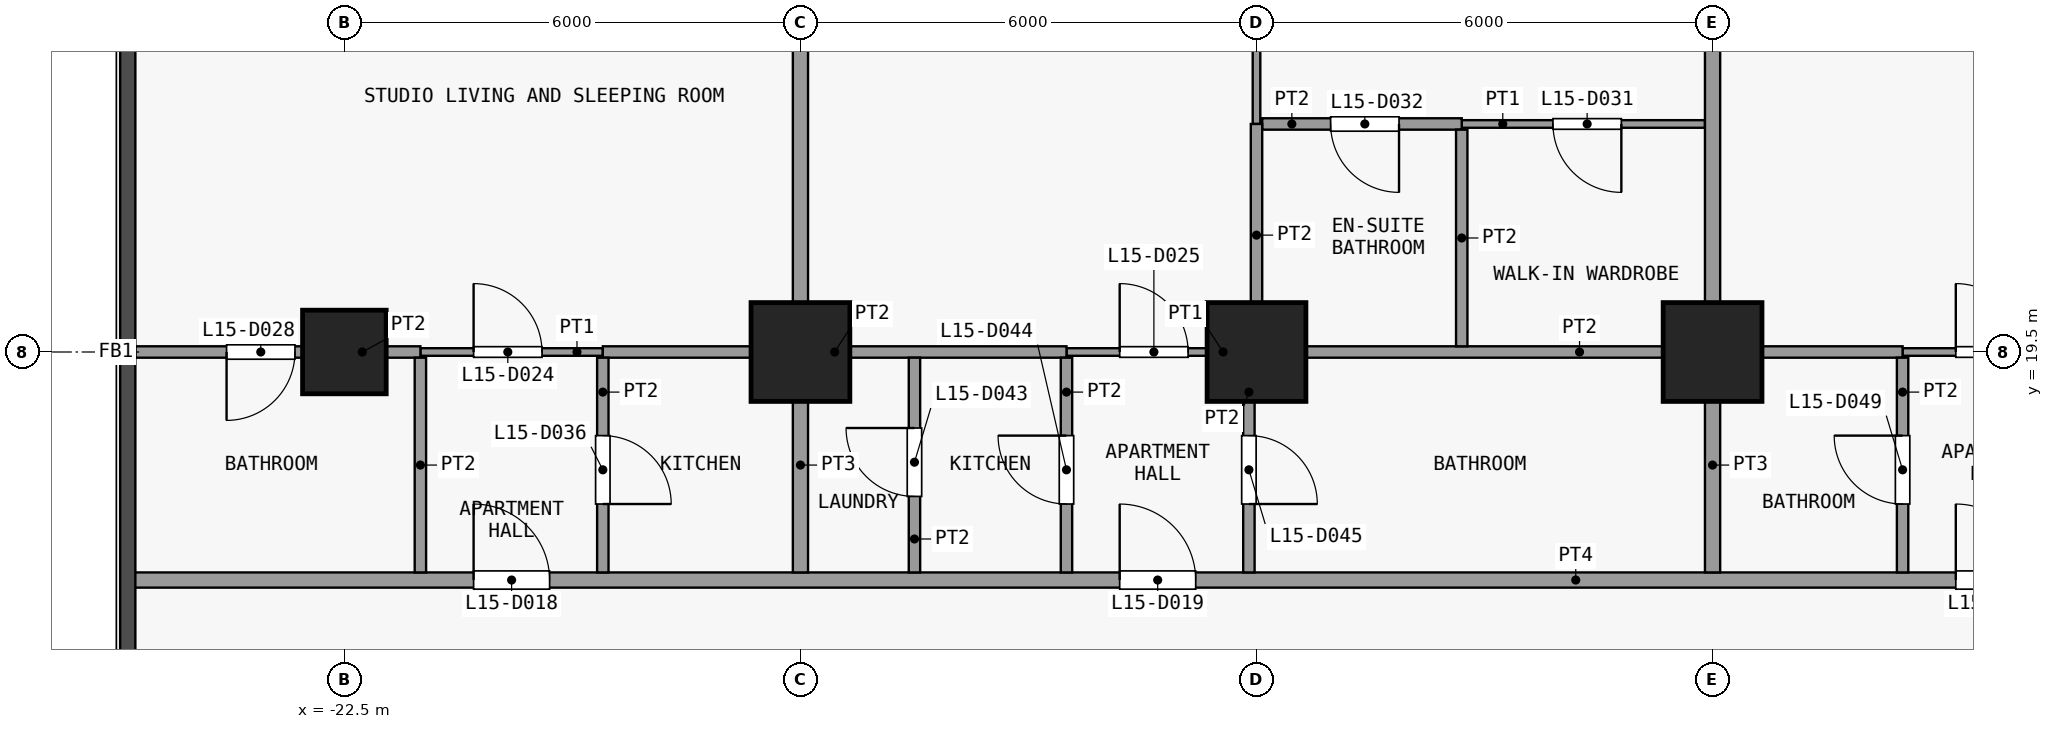
"""IFC4 building model, lengths in metres.
Left out: names, types, materials, properties, quantities, classifications, styles, units other than length and angle.
Written with IfcOpenShell. Run it as: python <this file> out.ifc"""

import sys

from ifc_helpers import new_model, si_unit, direction, frame, frame_2d, origin, origin_2d, place, context, subcontext, project, spatial, rectangle, extrude, element, fill, save


model = new_model("IFC4")
c1 = context("Model", 3, precision=1e-05, world=origin(), true_north=direction((0.0, 1.0)))
c2 = subcontext(c1, "Body", "Model", "MODEL_VIEW")
j1 = project(units=[si_unit("LENGTHUNIT", "METRE"), si_unit("PLANEANGLEUNIT", "RADIAN")], contexts=[c1])
p1 = place(None, origin())
s1 = spatial("IfcSite", under=j1, at=p1, CompositionType="ELEMENT")
p2 = place(p1, origin())
s2 = spatial("IfcBuilding", under=s1, at=p2, CompositionType="ELEMENT")
p3 = place(p2, frame((0.0, 0.0, 64.9)))
s3 = spatial("IfcBuildingStorey", under=s2, at=p3, CompositionType="ELEMENT", Elevation=64.9)
p4 = place(p3, frame((-22.5, 19.5, 0.0), z_axis=(0.0, 0.0, 1.0), x_axis=(1.0, 0.0, 0.0)))
e1 = element("IfcColumn", 1, at=p4, inside=s3, PredefinedType="COLUMN", context=c2, shape_type="SweptSolid", body=[
    extrude(rectangle(XDim=1.1, YDim=1.1, at=origin_2d()), origin(), (0.0, 0.0, 1.0), 3.6),
])
for number, where, z_axis, x_axis in (
    (2, (-16.5, 19.5, 0.0), (0.0, 0.0, 1.0), (1.0, 0.0, 0.0)),
    (3, (-10.5, 19.5, 0.0), (0.0, 0.0, 1.0), (1.0, 0.0, 0.0)),
    (4, (-4.5, 19.5, 0.0), (0.0, 0.0, 1.0), (1.0, 0.0, 0.0)),
):
    element("IfcColumn", number, at=place(p3, frame(where, z_axis=z_axis, x_axis=x_axis)), inside=s3, PredefinedType="COLUMN", context=c2, shape_type="SweptSolid", body=[
        extrude(rectangle(XDim=1.3, YDim=1.3, at=origin_2d()), origin(), (0.0, 0.0, 1.0), 3.6),
    ])
p5 = place(p3, frame((-25.35, 16.5, 0.0), z_axis=(0.0, 0.0, 1.0), x_axis=(1.0, 0.0, 0.0)))
e5 = element("IfcWall", 5, at=p5, inside=s3, PredefinedType="PARTITIONING", context=c2, shape_type="SweptSolid", body=[
    extrude(rectangle(XDim=51.6, YDim=0.2, at=frame_2d((25.8, 0.0))), origin(), (0.0, 0.0, 1.0), 3.3),
])
p6 = place(p5, frame((4.55, 0.0, 0.0)))
e6 = element("IfcOpeningElement", 6, at=p6, cuts=e5, PredefinedType="OPENING", context=c2, shape_type="SweptSolid", body=[
    extrude(rectangle(XDim=1.0, YDim=2.1, at=frame_2d((0.5, 1.05))), frame((0.0, 0.11, 0.0), z_axis=(0.0, -1.0, 0.0), x_axis=(1.0, 0.0, 0.0)), (0.0, 0.0, 1.0), 0.22),
])
p7 = place(p5, frame((13.05, 0.0, 0.0)))
e7 = element("IfcOpeningElement", 7, at=p7, cuts=e5, PredefinedType="OPENING", context=c2, shape_type="SweptSolid", body=[
    extrude(rectangle(XDim=1.0, YDim=2.1, at=frame_2d((0.5, 1.05))), frame((0.0, 0.11, 0.0), z_axis=(0.0, -1.0, 0.0), x_axis=(1.0, 0.0, 0.0)), (0.0, 0.0, 1.0), 0.22),
])
p8 = place(p5, frame((24.05, 0.0, 0.0)))
e8 = element("IfcOpeningElement", 8, at=p8, cuts=e5, PredefinedType="OPENING", context=c2, shape_type="SweptSolid", body=[
    extrude(rectangle(XDim=1.0, YDim=2.1, at=frame_2d((0.5, 1.05))), frame((0.0, 0.11, 0.0), z_axis=(0.0, -1.0, 0.0), x_axis=(1.0, 0.0, 0.0)), (0.0, 0.0, 1.0), 0.22),
])
p9 = place(p5, frame((32.35, 0.0, 0.0)))
e9 = element("IfcOpeningElement", 9, at=p9, cuts=e5, PredefinedType="OPENING", context=c2, shape_type="SweptSolid", body=[
    extrude(rectangle(XDim=0.9, YDim=2.1, at=frame_2d((0.45, 1.05))), frame((0.0, 0.11, 0.0), z_axis=(0.0, -1.0, 0.0), x_axis=(1.0, 0.0, 0.0)), (0.0, 0.0, 1.0), 0.22),
])
p10 = place(p5, frame((38.35, 0.0, 0.0)))
e10 = element("IfcOpeningElement", 10, at=p10, cuts=e5, PredefinedType="OPENING", context=c2, shape_type="SweptSolid", body=[
    extrude(rectangle(XDim=0.9, YDim=2.1, at=frame_2d((0.45, 1.05))), frame((0.0, 0.11, 0.0), z_axis=(0.0, -1.0, 0.0), x_axis=(1.0, 0.0, 0.0)), (0.0, 0.0, 1.0), 0.22),
])
p11 = place(p5, frame((45.05, 0.0, 0.0)))
e11 = element("IfcOpeningElement", 11, at=p11, cuts=e5, PredefinedType="OPENING", context=c2, shape_type="SweptSolid", body=[
    extrude(rectangle(XDim=1.0, YDim=2.1, at=frame_2d((0.5, 1.05))), frame((0.0, 0.11, 0.0), z_axis=(0.0, -1.0, 0.0), x_axis=(1.0, 0.0, 0.0)), (0.0, 0.0, 1.0), 0.22),
])
p12 = place(p3, frame((-21.5, 19.5, 0.0), z_axis=(0.0, 0.0, 1.0), x_axis=(1.0, 0.0, 0.0)))
e12 = element("IfcWall", 12, at=p12, inside=s3, PredefinedType="PARTITIONING", context=c2, shape_type="SweptSolid", body=[
    extrude(rectangle(XDim=2.4, YDim=0.1, at=frame_2d((1.2, 0.0))), origin(), (0.0, 0.0, 1.0), 3.3),
])
p13 = place(p12, frame((0.7, 0.0, 0.0)))
e13 = element("IfcOpeningElement", 13, at=p13, cuts=e12, PredefinedType="OPENING", context=c2, shape_type="SweptSolid", body=[
    extrude(rectangle(XDim=0.9, YDim=2.1, at=frame_2d((0.45, 1.05))), frame((0.0, 0.06, 0.0), z_axis=(0.0, -1.0, 0.0), x_axis=(1.0, 0.0, 0.0)), (0.0, 0.0, 1.0), 0.12),
])
p14 = place(p3, frame((-13.0, 19.5, 0.0), z_axis=(0.0, 0.0, 1.0), x_axis=(1.0, 0.0, 0.0)))
e14 = element("IfcWall", 14, at=p14, inside=s3, PredefinedType="PARTITIONING", context=c2, shape_type="SweptSolid", body=[
    extrude(rectangle(XDim=2.4, YDim=0.1, at=frame_2d((1.2, 0.0))), origin(), (0.0, 0.0, 1.0), 3.3),
])
p15 = place(p14, frame((0.7, 0.0, 0.0)))
e15 = element("IfcOpeningElement", 15, at=p15, cuts=e14, PredefinedType="OPENING", context=c2, shape_type="SweptSolid", body=[
    extrude(rectangle(XDim=0.9, YDim=2.1, at=frame_2d((0.45, 1.05))), frame((0.0, 0.06, 0.0), z_axis=(0.0, -1.0, 0.0), x_axis=(1.0, 0.0, 0.0)), (0.0, 0.0, 1.0), 0.12),
])
p16 = place(p3, frame((-2.0, 19.5, 0.0), z_axis=(0.0, 0.0, 1.0), x_axis=(1.0, 0.0, 0.0)))
e16 = element("IfcWall", 16, at=p16, inside=s3, PredefinedType="PARTITIONING", context=c2, shape_type="SweptSolid", body=[
    extrude(rectangle(XDim=2.4, YDim=0.1, at=frame_2d((1.2, 0.0))), origin(), (0.0, 0.0, 1.0), 3.3),
])
p17 = place(p16, frame((0.7, 0.0, 0.0)))
e17 = element("IfcOpeningElement", 17, at=p17, cuts=e16, PredefinedType="OPENING", context=c2, shape_type="SweptSolid", body=[
    extrude(rectangle(XDim=0.9, YDim=2.1, at=frame_2d((0.45, 1.05))), frame((0.0, 0.06, 0.0), z_axis=(0.0, -1.0, 0.0), x_axis=(1.0, 0.0, 0.0)), (0.0, 0.0, 1.0), 0.12),
])
p18 = place(p3, frame((-25.25, 19.5, 0.0), z_axis=(0.0, 0.0, 1.0), x_axis=(1.0, 0.0, 0.0)))
e18 = element("IfcWall", 18, at=p18, inside=s3, PredefinedType="PARTITIONING", context=c2, shape_type="SweptSolid", body=[
    extrude(rectangle(XDim=3.75, YDim=0.15, at=frame_2d((1.875, 0.0))), origin(), (0.0, 0.0, 1.0), 3.3),
])
p19 = place(p18, frame((1.2, 0.0, 0.0)))
e19 = element("IfcOpeningElement", 19, at=p19, cuts=e18, PredefinedType="OPENING", context=c2, shape_type="SweptSolid", body=[
    extrude(rectangle(XDim=0.9, YDim=2.1, at=frame_2d((0.45, 1.05))), frame((0.0, 0.085, 0.0), z_axis=(0.0, -1.0, 0.0), x_axis=(1.0, 0.0, 0.0)), (0.0, 0.0, 1.0), 0.17),
])
p20 = place(p3, frame((-19.1, 19.5, 0.0), z_axis=(0.0, 0.0, 1.0), x_axis=(1.0, 0.0, 0.0)))
e20 = element("IfcWall", 20, at=p20, inside=s3, PredefinedType="PARTITIONING", context=c2, shape_type="SweptSolid", body=[
    extrude(rectangle(XDim=6.1, YDim=0.15, at=frame_2d((3.05, 0.0))), origin(), (0.0, 0.0, 1.0), 3.3),
])
p21 = place(p3, frame((-10.5, 19.5, 0.0), z_axis=(0.0, 0.0, 1.0), x_axis=(1.0, 0.0, 0.0)))
e21 = element("IfcWall", 21, at=p21, inside=s3, PredefinedType="PARTITIONING", context=c2, shape_type="SweptSolid", body=[
    extrude(rectangle(XDim=8.5, YDim=0.15, at=frame_2d((4.25, 0.0))), origin(), (0.0, 0.0, 1.0), 3.3),
])
p22 = place(p3, frame((-7.8, 22.5, 0.0), z_axis=(0.0, 0.0, 1.0), x_axis=(1.0, 0.0, 0.0)))
e22 = element("IfcWall", 22, at=p22, inside=s3, PredefinedType="PARTITIONING", context=c2, shape_type="SweptSolid", body=[
    extrude(rectangle(XDim=3.2, YDim=0.1, at=frame_2d((1.6, 0.0))), origin(), (0.0, 0.0, 1.0), 3.3),
])
p23 = place(p22, frame((1.2, 0.0, 0.0)))
e23 = element("IfcOpeningElement", 23, at=p23, cuts=e22, PredefinedType="OPENING", context=c2, shape_type="SweptSolid", body=[
    extrude(rectangle(XDim=0.9, YDim=2.1, at=frame_2d((0.45, 1.05))), frame((0.0, 0.06, 0.0), z_axis=(0.0, -1.0, 0.0), x_axis=(1.0, 0.0, 0.0)), (0.0, 0.0, 1.0), 0.12),
])
p24 = place(p3, frame((-10.425, 22.5, 0.0), z_axis=(0.0, 0.0, 1.0), x_axis=(1.0, 0.0, 0.0)))
e24 = element("IfcWall", 24, at=p24, inside=s3, PredefinedType="PARTITIONING", context=c2, shape_type="SweptSolid", body=[
    extrude(rectangle(XDim=2.625, YDim=0.15, at=frame_2d((1.312, 0.0))), origin(), (0.0, 0.0, 1.0), 3.3),
])
p25 = place(p24, frame((0.9, 0.0, 0.0)))
e25 = element("IfcOpeningElement", 25, at=p25, cuts=e24, PredefinedType="OPENING", context=c2, shape_type="SweptSolid", body=[
    extrude(rectangle(XDim=0.9, YDim=2.1, at=frame_2d((0.45, 1.05))), frame((0.0, 0.085, 0.0), z_axis=(0.0, -1.0, 0.0), x_axis=(1.0, 0.0, 0.0)), (0.0, 0.0, 1.0), 0.17),
])
p26 = place(p3, frame((-21.5, 16.6, 0.0), z_axis=(0.0, 0.0, 1.0), x_axis=(0.0, 1.0, 0.0)))
e26 = element("IfcWall", 26, at=p26, inside=s3, PredefinedType="PARTITIONING", context=c2, shape_type="SweptSolid", body=[
    extrude(rectangle(XDim=2.825, YDim=0.15, at=frame_2d((1.413, 0.0))), origin(), (0.0, 0.0, 1.0), 3.3),
])
p27 = place(p3, frame((-19.1, 16.6, 0.0), z_axis=(0.0, 0.0, 1.0), x_axis=(0.0, 1.0, 0.0)))
e27 = element("IfcWall", 27, at=p27, inside=s3, PredefinedType="PARTITIONING", context=c2, shape_type="SweptSolid", body=[
    extrude(rectangle(XDim=2.825, YDim=0.15, at=frame_2d((1.413, 0.0))), origin(), (0.0, 0.0, 1.0), 3.3),
])
p28 = place(p27, frame((0.9, 0.0, 0.0)))
e28 = element("IfcOpeningElement", 28, at=p28, cuts=e27, PredefinedType="OPENING", context=c2, shape_type="SweptSolid", body=[
    extrude(rectangle(XDim=0.9, YDim=2.1, at=frame_2d((0.45, 1.05))), frame((0.0, 0.085, 0.0), z_axis=(0.0, -1.0, 0.0), x_axis=(1.0, 0.0, 0.0)), (0.0, 0.0, 1.0), 0.17),
])
p29 = place(p3, frame((-16.5, 16.6, 0.0), z_axis=(0.0, 0.0, 1.0), x_axis=(0.0, 1.0, 0.0)))
e29 = element("IfcWall", 29, at=p29, inside=s3, PredefinedType="PARTITIONING", context=c2, shape_type="SweptSolid", body=[
    extrude(rectangle(XDim=2.825, YDim=0.2, at=frame_2d((1.413, 0.0))), origin(), (0.0, 0.0, 1.0), 3.3),
])
p30 = place(p3, frame((-16.5, 19.575, 0.0), z_axis=(0.0, 0.0, 1.0), x_axis=(0.0, 1.0, 0.0)))
e30 = element("IfcWall", 30, at=p30, inside=s3, PredefinedType="PARTITIONING", context=c2, shape_type="SweptSolid", body=[
    extrude(rectangle(XDim=8.675, YDim=0.2, at=frame_2d((4.337, 0.0))), origin(), (0.0, 0.0, 1.0), 3.3),
])
p31 = place(p3, frame((-15.0, 16.6, 0.0), z_axis=(0.0, 0.0, 1.0), x_axis=(0.0, 1.0, 0.0)))
e31 = element("IfcWall", 31, at=p31, inside=s3, PredefinedType="PARTITIONING", context=c2, shape_type="SweptSolid", body=[
    extrude(rectangle(XDim=2.825, YDim=0.15, at=frame_2d((1.413, 0.0))), origin(), (0.0, 0.0, 1.0), 3.3),
])
p32 = place(p31, frame((1.0, 0.0, 0.0)))
e32 = element("IfcOpeningElement", 32, at=p32, cuts=e31, PredefinedType="OPENING", context=c2, shape_type="SweptSolid", body=[
    extrude(rectangle(XDim=0.9, YDim=2.1, at=frame_2d((0.45, 1.05))), frame((0.0, 0.085, 0.0), z_axis=(0.0, -1.0, 0.0), x_axis=(1.0, 0.0, 0.0)), (0.0, 0.0, 1.0), 0.17),
])
p33 = place(p3, frame((-13.0, 16.6, 0.0), z_axis=(0.0, 0.0, 1.0), x_axis=(0.0, 1.0, 0.0)))
e33 = element("IfcWall", 33, at=p33, inside=s3, PredefinedType="PARTITIONING", context=c2, shape_type="SweptSolid", body=[
    extrude(rectangle(XDim=2.825, YDim=0.15, at=frame_2d((1.413, 0.0))), origin(), (0.0, 0.0, 1.0), 3.3),
])
p34 = place(p33, frame((0.9, 0.0, 0.0)))
e34 = element("IfcOpeningElement", 34, at=p34, cuts=e33, PredefinedType="OPENING", context=c2, shape_type="SweptSolid", body=[
    extrude(rectangle(XDim=0.9, YDim=2.1, at=frame_2d((0.45, 1.05))), frame((0.0, 0.085, 0.0), z_axis=(0.0, -1.0, 0.0), x_axis=(1.0, 0.0, 0.0)), (0.0, 0.0, 1.0), 0.17),
])
p35 = place(p3, frame((-10.6, 16.6, 0.0), z_axis=(0.0, 0.0, 1.0), x_axis=(0.0, 1.0, 0.0)))
e35 = element("IfcWall", 35, at=p35, inside=s3, PredefinedType="PARTITIONING", context=c2, shape_type="SweptSolid", body=[
    extrude(rectangle(XDim=2.825, YDim=0.15, at=frame_2d((1.413, 0.0))), origin(), (0.0, 0.0, 1.0), 3.3),
])
p36 = place(p35, frame((0.9, 0.0, 0.0)))
e36 = element("IfcOpeningElement", 36, at=p36, cuts=e35, PredefinedType="OPENING", context=c2, shape_type="SweptSolid", body=[
    extrude(rectangle(XDim=0.9, YDim=2.1, at=frame_2d((0.45, 1.05))), frame((0.0, 0.085, 0.0), z_axis=(0.0, -1.0, 0.0), x_axis=(1.0, 0.0, 0.0)), (0.0, 0.0, 1.0), 0.17),
])
p37 = place(p3, frame((-10.5, 22.5, 0.0), z_axis=(0.0, 0.0, 1.0), x_axis=(0.0, 1.0, 0.0)))
e37 = element("IfcWall", 37, at=p37, inside=s3, PredefinedType="PARTITIONING", context=c2, shape_type="SweptSolid", body=[
    extrude(rectangle(XDim=5.75, YDim=0.1, at=frame_2d((2.875, 0.0))), origin(), (0.0, 0.0, 1.0), 3.3),
])
p38 = place(p37, frame((1.4, 0.0, 0.0)))
e38 = element("IfcOpeningElement", 38, at=p38, cuts=e37, PredefinedType="OPENING", context=c2, shape_type="SweptSolid", body=[
    extrude(rectangle(XDim=0.9, YDim=2.1, at=frame_2d((0.45, 1.05))), frame((0.0, 0.06, 0.0), z_axis=(0.0, -1.0, 0.0), x_axis=(1.0, 0.0, 0.0)), (0.0, 0.0, 1.0), 0.12),
])
p39 = place(p3, frame((-10.5, 19.575, 0.0), z_axis=(0.0, 0.0, 1.0), x_axis=(0.0, 1.0, 0.0)))
e39 = element("IfcWall", 39, at=p39, inside=s3, PredefinedType="PARTITIONING", context=c2, shape_type="SweptSolid", body=[
    extrude(rectangle(XDim=2.925, YDim=0.15, at=frame_2d((1.462, 0.0))), origin(), (0.0, 0.0, 1.0), 3.3),
])
p40 = place(p3, frame((-7.8, 19.575, 0.0), z_axis=(0.0, 0.0, 1.0), x_axis=(0.0, 1.0, 0.0)))
e40 = element("IfcWall", 40, at=p40, inside=s3, PredefinedType="PARTITIONING", context=c2, shape_type="SweptSolid", body=[
    extrude(rectangle(XDim=2.85, YDim=0.15, at=frame_2d((1.425, 0.0))), origin(), (0.0, 0.0, 1.0), 3.3),
])
p41 = place(p3, frame((-4.5, 16.6, 0.0), z_axis=(0.0, 0.0, 1.0), x_axis=(0.0, 1.0, 0.0)))
e41 = element("IfcWall", 41, at=p41, inside=s3, PredefinedType="PARTITIONING", context=c2, shape_type="SweptSolid", body=[
    extrude(rectangle(XDim=2.825, YDim=0.2, at=frame_2d((1.413, 0.0))), origin(), (0.0, 0.0, 1.0), 3.3),
])
p42 = place(p3, frame((-4.5, 19.575, 0.0), z_axis=(0.0, 0.0, 1.0), x_axis=(0.0, 1.0, 0.0)))
e42 = element("IfcWall", 42, at=p42, inside=s3, PredefinedType="PARTITIONING", context=c2, shape_type="SweptSolid", body=[
    extrude(rectangle(XDim=8.675, YDim=0.2, at=frame_2d((4.337, 0.0))), origin(), (0.0, 0.0, 1.0), 3.3),
])
p43 = place(p3, frame((-2.0, 16.6, 0.0), z_axis=(0.0, 0.0, 1.0), x_axis=(0.0, 1.0, 0.0)))
e43 = element("IfcWall", 43, at=p43, inside=s3, PredefinedType="PARTITIONING", context=c2, shape_type="SweptSolid", body=[
    extrude(rectangle(XDim=2.825, YDim=0.15, at=frame_2d((1.413, 0.0))), origin(), (0.0, 0.0, 1.0), 3.3),
])
p44 = place(p43, frame((0.9, 0.0, 0.0)))
e44 = element("IfcOpeningElement", 44, at=p44, cuts=e43, PredefinedType="OPENING", context=c2, shape_type="SweptSolid", body=[
    extrude(rectangle(XDim=0.9, YDim=2.1, at=frame_2d((0.45, 1.05))), frame((0.0, 0.085, 0.0), z_axis=(0.0, -1.0, 0.0), x_axis=(1.0, 0.0, 0.0)), (0.0, 0.0, 1.0), 0.17),
])
p45 = place(p6, origin())
e45 = element("IfcDoor", 45, at=p45, inside=s3, OperationType="SINGLE_SWING_RIGHT", PredefinedType="DOOR", context=c2, shape_type="SweptSolid", body=[
    extrude(rectangle(XDim=1.0, YDim=2.1, at=frame_2d((0.5, 1.05))), frame((0.0, 0.025, 0.0), z_axis=(0.0, -1.0, 0.0), x_axis=(1.0, 0.0, 0.0)), (0.0, 0.0, 1.0), 0.05),
])
fill(e6, e45)
p46 = place(p7, origin())
e46 = element("IfcDoor", 46, at=p46, inside=s3, OperationType="SINGLE_SWING_RIGHT", PredefinedType="DOOR", context=c2, shape_type="SweptSolid", body=[
    extrude(rectangle(XDim=1.0, YDim=2.1, at=frame_2d((0.5, 1.05))), frame((0.0, 0.025, 0.0), z_axis=(0.0, -1.0, 0.0), x_axis=(1.0, 0.0, 0.0)), (0.0, 0.0, 1.0), 0.05),
])
fill(e7, e46)
p47 = place(p8, origin())
e47 = element("IfcDoor", 47, at=p47, inside=s3, OperationType="SINGLE_SWING_RIGHT", PredefinedType="DOOR", context=c2, shape_type="SweptSolid", body=[
    extrude(rectangle(XDim=1.0, YDim=2.1, at=frame_2d((0.5, 1.05))), frame((0.0, 0.025, 0.0), z_axis=(0.0, -1.0, 0.0), x_axis=(1.0, 0.0, 0.0)), (0.0, 0.0, 1.0), 0.05),
])
fill(e8, e47)
p48 = place(p13, origin())
e48 = element("IfcDoor", 48, at=p48, inside=s3, OperationType="SINGLE_SWING_RIGHT", PredefinedType="DOOR", context=c2, shape_type="SweptSolid", body=[
    extrude(rectangle(XDim=0.9, YDim=2.1, at=frame_2d((0.45, 1.05))), frame((0.0, 0.025, 0.0), z_axis=(0.0, -1.0, 0.0), x_axis=(1.0, 0.0, 0.0)), (0.0, 0.0, 1.0), 0.05),
])
fill(e13, e48)
p49 = place(p15, origin())
e49 = element("IfcDoor", 49, at=p49, inside=s3, OperationType="SINGLE_SWING_RIGHT", PredefinedType="DOOR", context=c2, shape_type="SweptSolid", body=[
    extrude(rectangle(XDim=0.9, YDim=2.1, at=frame_2d((0.45, 1.05))), frame((0.0, 0.025, 0.0), z_axis=(0.0, -1.0, 0.0), x_axis=(1.0, 0.0, 0.0)), (0.0, 0.0, 1.0), 0.05),
])
fill(e15, e49)
p50 = place(p17, origin())
e50 = element("IfcDoor", 50, at=p50, inside=s3, OperationType="SINGLE_SWING_RIGHT", PredefinedType="DOOR", context=c2, shape_type="SweptSolid", body=[
    extrude(rectangle(XDim=0.9, YDim=2.1, at=frame_2d((0.45, 1.05))), frame((0.0, 0.025, 0.0), z_axis=(0.0, -1.0, 0.0), x_axis=(1.0, 0.0, 0.0)), (0.0, 0.0, 1.0), 0.05),
])
fill(e17, e50)
p51 = place(p19, origin())
e51 = element("IfcDoor", 51, at=p51, inside=s3, OperationType="SINGLE_SWING_LEFT", PredefinedType="DOOR", context=c2, shape_type="SweptSolid", body=[
    extrude(rectangle(XDim=0.9, YDim=2.1, at=frame_2d((0.45, 1.05))), frame((0.0, 0.025, 0.0), z_axis=(0.0, -1.0, 0.0), x_axis=(1.0, 0.0, 0.0)), (0.0, 0.0, 1.0), 0.05),
])
fill(e19, e51)
p52 = place(p23, origin())
e52 = element("IfcDoor", 52, at=p52, inside=s3, OperationType="SINGLE_SWING_RIGHT", PredefinedType="DOOR", context=c2, shape_type="SweptSolid", body=[
    extrude(rectangle(XDim=0.9, YDim=2.1, at=frame_2d((0.45, 1.05))), frame((0.0, 0.025, 0.0), z_axis=(0.0, -1.0, 0.0), x_axis=(1.0, 0.0, 0.0)), (0.0, 0.0, 1.0), 0.05),
])
fill(e23, e52)
p53 = place(p25, origin())
e53 = element("IfcDoor", 53, at=p53, inside=s3, OperationType="SINGLE_SWING_RIGHT", PredefinedType="DOOR", context=c2, shape_type="SweptSolid", body=[
    extrude(rectangle(XDim=0.9, YDim=2.1, at=frame_2d((0.45, 1.05))), frame((0.0, 0.025, 0.0), z_axis=(0.0, -1.0, 0.0), x_axis=(1.0, 0.0, 0.0)), (0.0, 0.0, 1.0), 0.05),
])
fill(e25, e53)
p54 = place(p28, origin())
e54 = element("IfcDoor", 54, at=p54, inside=s3, OperationType="SINGLE_SWING_LEFT", PredefinedType="DOOR", context=c2, shape_type="SweptSolid", body=[
    extrude(rectangle(XDim=0.9, YDim=2.1, at=frame_2d((0.45, 1.05))), frame((0.0, 0.025, 0.0), z_axis=(0.0, -1.0, 0.0), x_axis=(1.0, 0.0, 0.0)), (0.0, 0.0, 1.0), 0.05),
])
fill(e28, e54)
p55 = place(p32, origin())
e55 = element("IfcDoor", 55, at=p55, inside=s3, OperationType="SINGLE_SWING_LEFT", PredefinedType="DOOR", context=c2, shape_type="SweptSolid", body=[
    extrude(rectangle(XDim=0.9, YDim=2.1, at=frame_2d((0.45, 1.05))), frame((0.0, 0.025, 0.0), z_axis=(0.0, -1.0, 0.0), x_axis=(1.0, 0.0, 0.0)), (0.0, 0.0, 1.0), 0.05),
])
fill(e32, e55)
p56 = place(p34, origin())
e56 = element("IfcDoor", 56, at=p56, inside=s3, OperationType="SINGLE_SWING_LEFT", PredefinedType="DOOR", context=c2, shape_type="SweptSolid", body=[
    extrude(rectangle(XDim=0.9, YDim=2.1, at=frame_2d((0.45, 1.05))), frame((0.0, 0.025, 0.0), z_axis=(0.0, -1.0, 0.0), x_axis=(1.0, 0.0, 0.0)), (0.0, 0.0, 1.0), 0.05),
])
fill(e34, e56)
p57 = place(p36, origin())
e57 = element("IfcDoor", 57, at=p57, inside=s3, OperationType="SINGLE_SWING_LEFT", PredefinedType="DOOR", context=c2, shape_type="SweptSolid", body=[
    extrude(rectangle(XDim=0.9, YDim=2.1, at=frame_2d((0.45, 1.05))), frame((0.0, 0.025, 0.0), z_axis=(0.0, -1.0, 0.0), x_axis=(1.0, 0.0, 0.0)), (0.0, 0.0, 1.0), 0.05),
])
fill(e36, e57)
p58 = place(p44, origin())
e58 = element("IfcDoor", 58, at=p58, inside=s3, OperationType="SINGLE_SWING_LEFT", PredefinedType="DOOR", context=c2, shape_type="SweptSolid", body=[
    extrude(rectangle(XDim=0.9, YDim=2.1, at=frame_2d((0.45, 1.05))), frame((0.0, 0.025, 0.0), z_axis=(0.0, -1.0, 0.0), x_axis=(1.0, 0.0, 0.0)), (0.0, 0.0, 1.0), 0.05),
])
fill(e44, e58)
save(model, sys.argv[1])
